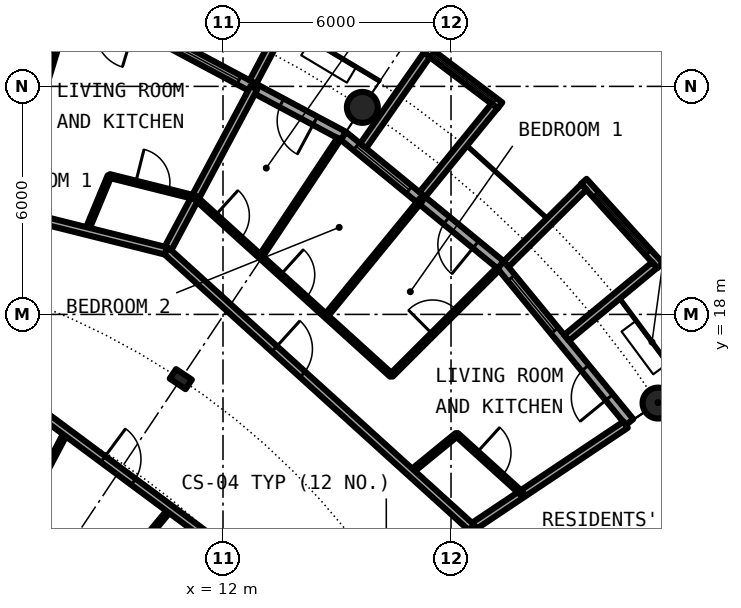
"""IFC4 building model, lengths in metres.
Left out: names, types, materials, properties, quantities, classifications, styles, units other than length and angle.
Written with IfcOpenShell. Run it as: python <this file> out.ifc"""

import sys

from ifc_helpers import new_model, si_unit, direction, frame, frame_2d, origin, origin_2d, place, context, subcontext, project, spatial, rectangle, circle, hollow_circle, i_section, extrude, element, fill, save


model = new_model("IFC4")
c1 = context("Model", 3, precision=1e-05, world=origin(), true_north=direction((0.0, 1.0)))
c2 = subcontext(c1, "Body", "Model", "MODEL_VIEW")
j1 = project(units=[si_unit("LENGTHUNIT", "METRE"), si_unit("PLANEANGLEUNIT", "RADIAN")], contexts=[c1])
p1 = place(None, origin())
s1 = spatial("IfcSite", under=j1, at=p1, CompositionType="ELEMENT")
p2 = place(p1, origin())
s2 = spatial("IfcBuilding", under=s1, at=p2, CompositionType="ELEMENT")
p3 = place(p2, frame((0.0, 0.0, 154.35)))
s3 = spatial("IfcBuildingStorey", under=s2, at=p3, CompositionType="ELEMENT", Elevation=154.35)
for number, where, z_axis, x_axis in (
    (1, (23.448, 15.667, 0.0), (0.0, 0.0, 1.0), (1.0, 0.0, 0.0)),
    (2, (15.667, 23.448, 0.0), (0.0, 0.0, 1.0), (1.0, 0.0, 0.0)),
):
    element("IfcColumn", number, at=place(p3, frame(where, z_axis=z_axis, x_axis=x_axis)), inside=s3, PredefinedType="COLUMN", context=c2, shape_type="SweptSolid", body=[
        extrude(hollow_circle(Radius=0.406, WallThickness=0.04, at=origin_2d()), origin(), (0.0, 0.0, 1.0), 3.05),
    ])
p4 = place(p3, frame((10.889, 16.297, 0.0), z_axis=(0.0, 0.0, 1.0), x_axis=(0.55557023302, 0.831469612303, 0.0)))
e3 = element("IfcColumn", 3, at=p4, inside=s3, PredefinedType="COLUMN", context=c2, shape_type="SweptSolid", body=[
    extrude(i_section(OverallWidth=0.3, OverallDepth=0.5, WebThickness=0.014, FlangeThickness=0.028, FilletRadius=0.027, at=origin_2d()), origin(), (0.0, 0.0, 1.0), 3.05),
])
p5 = place(p3, frame((22.699, 15.167, 0.0), z_axis=(0.0, 0.0, 1.0), x_axis=(-0.634382322723, 0.773019449054, 0.0)))
e4 = element("IfcWall", 4, at=p5, inside=s3, PredefinedType="SOLIDWALL", context=c2, shape_type="SweptSolid", body=[
    extrude(rectangle(XDim=5.352, YDim=0.25, at=frame_2d((2.676, 0.0))), origin(), (0.0, 0.0, 1.0), 2.7),
])
p6 = place(p5, frame((0.841, 0.0, 0.0)))
e5 = element("IfcOpeningElement", 5, at=p6, cuts=e4, PredefinedType="OPENING", context=c2, shape_type="SweptSolid", body=[
    extrude(rectangle(XDim=1.0, YDim=2.2, at=frame_2d((0.5, 1.1))), frame((0.0, 0.135, 0.0), z_axis=(0.0, -1.0, 0.0), x_axis=(1.0, 0.0, 0.0)), (0.0, 0.0, 1.0), 0.27),
])
p7 = place(p5, frame((3.111, 0.0, 0.3)))
e6 = element("IfcOpeningElement", 6, at=p7, cuts=e4, PredefinedType="OPENING", context=c2, shape_type="SweptSolid", body=[
    extrude(rectangle(XDim=1.8, YDim=2.1, at=frame_2d((0.9, 1.05))), frame((0.0, 0.135, 0.0), z_axis=(0.0, -1.0, 0.0), x_axis=(1.0, 0.0, 0.0)), (0.0, 0.0, 1.0), 0.27),
])
p8 = place(p3, frame((23.503, 19.282, -0.03), z_axis=(0.0, 0.0, 1.0), x_axis=(-0.671506829416, 0.740998365753, 0.0)))
e7 = element("IfcWall", 7, at=p8, inside=s3, PredefinedType="SOLIDWALL", context=c2, shape_type="SweptSolid", body=[
    extrude(rectangle(XDim=2.993, YDim=0.2, at=frame_2d((1.497, 0.0))), origin(), (0.0, 0.0, 1.0), 2.73),
])
p9 = place(p8, frame((0.457, 0.0, 0.33)))
e8 = element("IfcOpeningElement", 8, at=p9, cuts=e7, PredefinedType="OPENING", context=c2, shape_type="SweptSolid", body=[
    extrude(circle(Radius=1.04, at=frame_2d((1.04, 1.04))), frame((0.0, 0.11, 0.0), z_axis=(0.0, -1.0, 0.0), x_axis=(1.0, 0.0, 0.0)), (0.0, 0.0, 1.0), 0.22),
])
p10 = place(p3, frame((21.041, 17.384, -0.03), z_axis=(0.0, 0.0, 1.0), x_axis=(0.770784861449, 0.63709551667, 0.0)))
e9 = element("IfcWall", 9, at=p10, inside=s3, PredefinedType="SOLIDWALL", context=c2, shape_type="SweptSolid", body=[
    extrude(rectangle(XDim=3.006, YDim=0.2, at=frame_2d((1.503, 0.0))), origin(), (0.0, 0.0, 1.0), 2.73),
])
p11 = place(p3, frame((19.45, 19.323, -0.03), z_axis=(0.0, 0.0, 1.0), x_axis=(0.709727076896, 0.704476739375, 0.0)))
e10 = element("IfcWall", 10, at=p11, inside=s3, PredefinedType="SOLIDWALL", context=c2, shape_type="SweptSolid", body=[
    extrude(rectangle(XDim=2.883, YDim=0.2, at=frame_2d((1.441, 0.0))), origin(), (0.0, 0.0, 1.0), 2.73),
])
p12 = place(p3, frame((19.304, 19.304, 0.0), z_axis=(0.0, 0.0, 1.0), x_axis=(-0.773019449054, 0.634382322723, 0.0)))
e11 = element("IfcWall", 11, at=p12, inside=s3, PredefinedType="SOLIDWALL", context=c2, shape_type="SweptSolid", body=[
    extrude(rectangle(XDim=5.352, YDim=0.25, at=frame_2d((2.676, 0.0))), origin(), (0.0, 0.0, 1.0), 2.7),
])
p13 = place(p12, frame((0.841, 0.0, 0.0)))
e12 = element("IfcOpeningElement", 12, at=p13, cuts=e11, PredefinedType="OPENING", context=c2, shape_type="SweptSolid", body=[
    extrude(rectangle(XDim=1.0, YDim=2.2, at=frame_2d((0.5, 1.1))), frame((0.0, 0.135, 0.0), z_axis=(0.0, -1.0, 0.0), x_axis=(1.0, 0.0, 0.0)), (0.0, 0.0, 1.0), 0.27),
])
p14 = place(p12, frame((3.111, 0.0, 0.3)))
e13 = element("IfcOpeningElement", 13, at=p14, cuts=e11, PredefinedType="OPENING", context=c2, shape_type="SweptSolid", body=[
    extrude(rectangle(XDim=1.8, YDim=2.1, at=frame_2d((0.9, 1.05))), frame((0.0, 0.135, 0.0), z_axis=(0.0, -1.0, 0.0), x_axis=(1.0, 0.0, 0.0)), (0.0, 0.0, 1.0), 0.27),
])
p15 = place(p3, frame((19.289, 23.497, -0.03), z_axis=(0.0, 0.0, 1.0), x_axis=(-0.797887588059, 0.602806268067, 0.0)))
e14 = element("IfcWall", 14, at=p15, inside=s3, PredefinedType="SOLIDWALL", context=c2, shape_type="SweptSolid", body=[
    extrude(rectangle(XDim=2.447, YDim=0.2, at=frame_2d((1.223, 0.0))), origin(), (0.0, 0.0, 1.0), 2.73),
])
p16 = place(p15, frame((0.183, 0.0, 0.33)))
e15 = element("IfcOpeningElement", 15, at=p16, cuts=e14, PredefinedType="OPENING", context=c2, shape_type="SweptSolid", body=[
    extrude(circle(Radius=1.04, at=frame_2d((1.04, 1.04))), frame((0.0, 0.11, 0.0), z_axis=(0.0, -1.0, 0.0), x_axis=(1.0, 0.0, 0.0)), (0.0, 0.0, 1.0), 0.22),
])
p17 = place(p3, frame((17.246, 21.155, -0.03), z_axis=(0.0, 0.0, 1.0), x_axis=(0.631741648902, 0.775179004516, 0.0)))
e16 = element("IfcWall", 16, at=p17, inside=s3, PredefinedType="SOLIDWALL", context=c2, shape_type="SweptSolid", body=[
    extrude(rectangle(XDim=3.006, YDim=0.2, at=frame_2d((1.503, 0.0))), origin(), (0.0, 0.0, 1.0), 2.73),
])
p18 = place(p3, frame((15.688, 22.433, -0.03), z_axis=(0.0, 0.0, 1.0), x_axis=(0.573260687834, 0.819373043115, 0.0)))
e17 = element("IfcWall", 17, at=p18, inside=s3, PredefinedType="SOLIDWALL", context=c2, shape_type="SweptSolid", body=[
    extrude(rectangle(XDim=2.925, YDim=0.2, at=frame_2d((1.463, 0.0))), origin(), (0.0, 0.0, 1.0), 2.73),
])
p19 = place(p3, frame((15.167, 22.699, 0.0), z_axis=(0.0, 0.0, 1.0), x_axis=(-0.881915646801, 0.471407246368, 0.0)))
e18 = element("IfcWall", 18, at=p19, inside=s3, PredefinedType="SOLIDWALL", context=c2, shape_type="SweptSolid", body=[
    extrude(rectangle(XDim=5.352, YDim=0.25, at=frame_2d((2.676, 0.0))), origin(), (0.0, 0.0, 1.0), 2.7),
])
p20 = place(p19, frame((0.841, 0.0, 0.0)))
e19 = element("IfcOpeningElement", 19, at=p20, cuts=e18, PredefinedType="OPENING", context=c2, shape_type="SweptSolid", body=[
    extrude(rectangle(XDim=1.0, YDim=2.2, at=frame_2d((0.5, 1.1))), frame((0.0, 0.135, 0.0), z_axis=(0.0, -1.0, 0.0), x_axis=(1.0, 0.0, 0.0)), (0.0, 0.0, 1.0), 0.27),
])
p21 = place(p19, frame((3.111, 0.0, 0.3)))
e20 = element("IfcOpeningElement", 20, at=p21, cuts=e18, PredefinedType="OPENING", context=c2, shape_type="SweptSolid", body=[
    extrude(rectangle(XDim=1.8, YDim=2.1, at=frame_2d((0.9, 1.05))), frame((0.0, 0.135, 0.0), z_axis=(0.0, -1.0, 0.0), x_axis=(1.0, 0.0, 0.0)), (0.0, 0.0, 1.0), 0.27),
])
p22 = place(p3, frame((12.787, 24.113, -0.03), z_axis=(0.0, 0.0, 1.0), x_axis=(0.468365282436, 0.883534924159, 0.0)))
e21 = element("IfcWall", 21, at=p22, inside=s3, PredefinedType="SOLIDWALL", context=c2, shape_type="SweptSolid", body=[
    extrude(rectangle(XDim=3.006, YDim=0.2, at=frame_2d((1.503, 0.0))), origin(), (0.0, 0.0, 1.0), 2.73),
])
p23 = place(p3, frame((8.41, 20.193, 0.0), z_axis=(0.0, 0.0, 1.0), x_axis=(0.384228756538, 0.923237923099, 0.0)))
e22 = element("IfcWall", 22, at=p23, inside=s3, PredefinedType="PARTITIONING", context=c2, shape_type="SweptSolid", body=[
    extrude(rectangle(XDim=1.569, YDim=0.1, at=frame_2d((0.785, 0.0))), origin(), (0.0, 0.0, 1.0), 2.7),
])
p24 = place(p3, frame((4.909, 5.958, 0.0), z_axis=(0.0, 0.0, 1.0), x_axis=(0.635879010442, 0.771788756124, 0.0)))
e23 = element("IfcWall", 23, at=p24, inside=s3, PredefinedType="PARTITIONING", context=c2, shape_type="SweptSolid", body=[
    extrude(rectangle(XDim=8.967, YDim=0.1, at=frame_2d((4.484, 0.0))), origin(), (0.0, 0.0, 1.0), 2.7),
])
p25 = place(p24, frame((6.4, 0.0, 0.0)))
e24 = element("IfcOpeningElement", 24, at=p25, cuts=e23, PredefinedType="OPENING", context=c2, shape_type="SweptSolid", body=[
    extrude(rectangle(XDim=0.9, YDim=2.3, at=frame_2d((0.45, 1.15))), frame((0.0, 0.06, 0.0), z_axis=(0.0, -1.0, 0.0), x_axis=(1.0, 0.0, 0.0)), (0.0, 0.0, 1.0), 0.12),
])
p26 = place(p24, frame((1.917, 0.0, 0.0)))
e25 = element("IfcOpeningElement", 25, at=p26, cuts=e23, PredefinedType="OPENING", context=c2, shape_type="SweptSolid", body=[
    extrude(rectangle(XDim=0.9, YDim=2.3, at=frame_2d((0.45, 1.15))), frame((0.0, 0.06, 0.0), z_axis=(0.0, -1.0, 0.0), x_axis=(1.0, 0.0, 0.0)), (0.0, 0.0, 1.0), 0.12),
])
p27 = place(p3, frame((5.877, 11.125, 0.0), z_axis=(0.0, 0.0, 1.0), x_axis=(0.467030118529, 0.884241408432, 0.0)))
e26 = element("IfcWall", 26, at=p27, inside=s3, PredefinedType="PARTITIONING", context=c2, shape_type="SweptSolid", body=[
    extrude(rectangle(XDim=4.278, YDim=0.1, at=frame_2d((2.139, 0.0))), origin(), (0.0, 0.0, 1.0), 2.7),
])
p28 = place(p27, frame((1.689, 0.0, 0.0)))
e27 = element("IfcOpeningElement", 27, at=p28, cuts=e26, PredefinedType="OPENING", context=c2, shape_type="SweptSolid", body=[
    extrude(rectangle(XDim=0.9, YDim=2.3, at=frame_2d((0.45, 1.15))), frame((0.0, 0.06, 0.0), z_axis=(0.0, -1.0, 0.0), x_axis=(1.0, 0.0, 0.0)), (0.0, 0.0, 1.0), 0.12),
])
p29 = place(p3, frame((6.76, 22.207, 0.0), z_axis=(0.0, 0.0, 1.0), x_axis=(0.291291575636, 0.956634317785, 0.0)))
e28 = element("IfcWall", 28, at=p29, inside=s3, PredefinedType="PARTITIONING", context=c2, shape_type="SweptSolid", body=[
    extrude(rectangle(XDim=3.962, YDim=0.1, at=frame_2d((1.981, 0.0))), origin(), (0.0, 0.0, 1.0), 2.7),
])
p30 = place(p29, frame((1.531, 0.0, 0.0)))
e29 = element("IfcOpeningElement", 29, at=p30, cuts=e28, PredefinedType="OPENING", context=c2, shape_type="SweptSolid", body=[
    extrude(rectangle(XDim=0.9, YDim=2.3, at=frame_2d((0.45, 1.15))), frame((0.0, 0.06, 0.0), z_axis=(0.0, -1.0, 0.0), x_axis=(1.0, 0.0, 0.0)), (0.0, 0.0, 1.0), 0.12),
])
p31 = place(p3, frame((10.516, 19.665, 0.0), z_axis=(0.0, 0.0, 1.0), x_axis=(0.471388689095, 0.881925565903, 0.0)))
e30 = element("IfcWall", 30, at=p31, inside=s3, PredefinedType="PARTITIONING", context=c2, shape_type="SweptSolid", body=[
    extrude(rectangle(XDim=4.875, YDim=0.2, at=frame_2d((2.438, 0.0))), origin(), (0.0, 0.0, 1.0), 2.7),
])
p32 = place(p3, frame((12.988, 19.518, 0.0), z_axis=(0.0, 0.0, 1.0), x_axis=(0.553823887887, 0.83263383381, 0.0)))
e31 = element("IfcWall", 31, at=p32, inside=s3, PredefinedType="PARTITIONING", context=c2, shape_type="SweptSolid", body=[
    extrude(rectangle(XDim=3.73, YDim=0.1, at=frame_2d((1.865, 0.0))), origin(), (0.0, 0.0, 1.0), 2.7),
])
p33 = place(p3, frame((14.709, 17.958, 0.0), z_axis=(0.0, 0.0, 1.0), x_axis=(0.633590098448, 0.773668913133, 0.0)))
e32 = element("IfcWall", 32, at=p33, inside=s3, PredefinedType="PARTITIONING", context=c2, shape_type="SweptSolid", body=[
    extrude(rectangle(XDim=3.962, YDim=0.1, at=frame_2d((1.981, 0.0))), origin(), (0.0, 0.0, 1.0), 2.7),
])
p34 = place(p3, frame((16.43, 16.398, 0.0), z_axis=(0.0, 0.0, 1.0), x_axis=(0.707722727509, 0.706490297858, 0.0)))
e33 = element("IfcWall", 33, at=p34, inside=s3, PredefinedType="PARTITIONING", context=c2, shape_type="SweptSolid", body=[
    extrude(rectangle(XDim=3.962, YDim=0.1, at=frame_2d((1.981, 0.0))), origin(), (0.0, 0.0, 1.0), 2.7),
])
p35 = place(p34, frame((1.531, 0.0, 0.0)))
e34 = element("IfcOpeningElement", 34, at=p35, cuts=e33, PredefinedType="OPENING", context=c2, shape_type="SweptSolid", body=[
    extrude(rectangle(XDim=0.9, YDim=2.3, at=frame_2d((0.45, 1.15))), frame((0.0, 0.06, 0.0), z_axis=(0.0, -1.0, 0.0), x_axis=(1.0, 0.0, 0.0)), (0.0, 0.0, 1.0), 0.12),
])
p36 = place(p3, frame((16.936, 13.845, 0.0), z_axis=(0.0, 0.0, 1.0), x_axis=(0.774283039722, 0.632839453889, 0.0)))
e35 = element("IfcWall", 35, at=p36, inside=s3, PredefinedType="PARTITIONING", context=c2, shape_type="SweptSolid", body=[
    extrude(rectangle(XDim=1.569, YDim=0.1, at=frame_2d((0.785, 0.0))), origin(), (0.0, 0.0, 1.0), 2.7),
])
p37 = place(p3, frame((18.542, 12.389, 0.0), z_axis=(0.0, 0.0, 1.0), x_axis=(0.831387096605, 0.55569370664, 0.0)))
e36 = element("IfcWall", 36, at=p37, inside=s3, PredefinedType="PARTITIONING", context=c2, shape_type="SweptSolid", body=[
    extrude(rectangle(XDim=4.875, YDim=0.2, at=frame_2d((2.438, 0.0))), origin(), (0.0, 0.0, 1.0), 2.7),
])
p38 = place(p3, frame((5.137, 16.938, 0.0), z_axis=(0.0, 0.0, 1.0), x_axis=(0.803229232922, -0.595670042371, 0.0)))
e37 = element("IfcWall", 37, at=p38, inside=s3, PredefinedType="PARTITIONING", context=c2, shape_type="SweptSolid", body=[
    extrude(rectangle(XDim=10.224, YDim=0.2, at=frame_2d((5.112, 0.0))), origin(), (0.0, 0.0, 1.0), 2.7),
])
p39 = place(p38, frame((4.612, 0.0, 0.0)))
e38 = element("IfcOpeningElement", 38, at=p39, cuts=e37, PredefinedType="OPENING", context=c2, shape_type="SweptSolid", body=[
    extrude(rectangle(XDim=1.0, YDim=2.3, at=frame_2d((0.5, 1.15))), frame((0.0, 0.11, 0.0), z_axis=(0.0, -1.0, 0.0), x_axis=(1.0, 0.0, 0.0)), (0.0, 0.0, 1.0), 0.22),
])
p40 = place(p3, frame((-0.006, 22.299, 0.0), z_axis=(0.0, 0.0, 1.0), x_axis=(0.970086843848, -0.242758141765, 0.0)))
e39 = element("IfcWall", 39, at=p40, inside=s3, PredefinedType="PARTITIONING", context=c2, shape_type="SweptSolid", body=[
    extrude(rectangle(XDim=10.842, YDim=0.2, at=frame_2d((5.421, 0.0))), origin(), (0.0, 0.0, 1.0), 2.7),
])
p41 = place(p40, frame((3.841, 0.0, 0.0)))
e40 = element("IfcOpeningElement", 40, at=p41, cuts=e39, PredefinedType="OPENING", context=c2, shape_type="SweptSolid", body=[
    extrude(rectangle(XDim=1.0, YDim=2.3, at=frame_2d((0.5, 1.15))), frame((0.0, 0.11, 0.0), z_axis=(0.0, -1.0, 0.0), x_axis=(1.0, 0.0, 0.0)), (0.0, 0.0, 1.0), 0.22),
])
p42 = place(p3, frame((10.512, 19.667, 0.0), z_axis=(0.0, 0.0, 1.0), x_axis=(0.740947367223, -0.671563101283, 0.0)))
e41 = element("IfcWall", 41, at=p42, inside=s3, PredefinedType="PARTITIONING", context=c2, shape_type="SweptSolid", body=[
    extrude(rectangle(XDim=10.837, YDim=0.2, at=frame_2d((5.419, 0.0))), origin(), (0.0, 0.0, 1.0), 2.7),
])
p43 = place(p42, frame((3.835, 0.0, 0.0)))
e42 = element("IfcOpeningElement", 42, at=p43, cuts=e41, PredefinedType="OPENING", context=c2, shape_type="SweptSolid", body=[
    extrude(rectangle(XDim=1.0, YDim=2.3, at=frame_2d((0.5, 1.15))), frame((0.0, 0.11, 0.0), z_axis=(0.0, -1.0, 0.0), x_axis=(1.0, 0.0, 0.0)), (0.0, 0.0, 1.0), 0.22),
])
p44 = place(p3, frame((18.542, 12.389, 0.0), z_axis=(0.0, 0.0, 1.0), x_axis=(0.465605550524, -0.884992356646, 0.0)))
e43 = element("IfcWall", 43, at=p44, inside=s3, PredefinedType="PARTITIONING", context=c2, shape_type="SweptSolid", body=[
    extrude(rectangle(XDim=1.643, YDim=0.2, at=frame_2d((0.821, 0.0))), origin(), (0.0, 0.0, 1.0), 2.7),
])
p45 = place(p3, frame((9.013, 21.642, 0.0), z_axis=(0.0, 0.0, 1.0), x_axis=(0.970049686104, -0.242906579758, 0.0)))
e44 = element("IfcWall", 44, at=p45, inside=s3, PredefinedType="PARTITIONING", context=c2, shape_type="SweptSolid", body=[
    extrude(rectangle(XDim=2.323, YDim=0.1, at=frame_2d((1.161, 0.0))), origin(), (0.0, 0.0, 1.0), 2.7),
])
p46 = place(p45, frame((0.711, 0.0, 0.0)))
e45 = element("IfcOpeningElement", 45, at=p46, cuts=e44, PredefinedType="OPENING", context=c2, shape_type="SweptSolid", body=[
    extrude(rectangle(XDim=0.9, YDim=2.3, at=frame_2d((0.45, 1.15))), frame((0.0, 0.06, 0.0), z_axis=(0.0, -1.0, 0.0), x_axis=(1.0, 0.0, 0.0)), (0.0, 0.0, 1.0), 0.12),
])
p47 = place(p3, frame((11.266, 21.078, 0.0), z_axis=(0.0, 0.0, 1.0), x_axis=(0.74097115376, -0.671536856245, 0.0)))
e46 = element("IfcWall", 46, at=p47, inside=s3, PredefinedType="PARTITIONING", context=c2, shape_type="SweptSolid", body=[
    extrude(rectangle(XDim=6.969, YDim=0.1, at=frame_2d((3.484, 0.0))), origin(), (0.0, 0.0, 1.0), 2.7),
])
p48 = place(p47, frame((3.034, 0.0, 0.0)))
e47 = element("IfcOpeningElement", 47, at=p48, cuts=e46, PredefinedType="OPENING", context=c2, shape_type="SweptSolid", body=[
    extrude(rectangle(XDim=0.9, YDim=2.3, at=frame_2d((0.45, 1.15))), frame((0.0, 0.06, 0.0), z_axis=(0.0, -1.0, 0.0), x_axis=(1.0, 0.0, 0.0)), (0.0, 0.0, 1.0), 0.12),
])
p49 = place(p47, frame((0.712, 0.0, 0.0)))
e48 = element("IfcOpeningElement", 48, at=p49, cuts=e46, PredefinedType="OPENING", context=c2, shape_type="SweptSolid", body=[
    extrude(rectangle(XDim=0.9, YDim=2.3, at=frame_2d((0.45, 1.15))), frame((0.0, 0.06, 0.0), z_axis=(0.0, -1.0, 0.0), x_axis=(1.0, 0.0, 0.0)), (0.0, 0.0, 1.0), 0.12),
])
p50 = place(p3, frame((18.149, 14.84, 0.0), z_axis=(0.0, 0.0, 1.0), x_axis=(0.741127434804, -0.671364376014, 0.0)))
e49 = element("IfcWall", 49, at=p50, inside=s3, PredefinedType="PARTITIONING", context=c2, shape_type="SweptSolid", body=[
    extrude(rectangle(XDim=2.324, YDim=0.1, at=frame_2d((1.162, 0.0))), origin(), (0.0, 0.0, 1.0), 2.7),
])
p51 = place(p50, frame((0.714, 0.0, 0.0)))
e50 = element("IfcOpeningElement", 50, at=p51, cuts=e49, PredefinedType="OPENING", context=c2, shape_type="SweptSolid", body=[
    extrude(rectangle(XDim=0.9, YDim=2.3, at=frame_2d((0.45, 1.15))), frame((0.0, 0.06, 0.0), z_axis=(0.0, -1.0, 0.0), x_axis=(1.0, 0.0, 0.0)), (0.0, 0.0, 1.0), 0.12),
])
p52 = place(p6, origin())
e51 = element("IfcDoor", 51, at=p52, inside=s3, OperationType="SINGLE_SWING_LEFT", PredefinedType="DOOR", context=c2, shape_type="SweptSolid", body=[
    extrude(rectangle(XDim=1.0, YDim=2.2, at=frame_2d((0.5, 1.1))), frame((0.0, 0.025, 0.0), z_axis=(0.0, -1.0, 0.0), x_axis=(1.0, 0.0, 0.0)), (0.0, 0.0, 1.0), 0.05),
])
fill(e5, e51)
p53 = place(p7, origin())
e52 = element("IfcWindow", 52, at=p53, inside=s3, PartitioningType="SINGLE_PANEL", PredefinedType="WINDOW", context=c2, shape_type="SweptSolid", body=[
    extrude(rectangle(XDim=1.8, YDim=2.1, at=frame_2d((0.9, 1.05))), frame((0.0, 0.03, 0.0), z_axis=(0.0, -1.0, 0.0), x_axis=(1.0, 0.0, 0.0)), (0.0, 0.0, 1.0), 0.06),
])
fill(e6, e52)
p54 = place(p9, origin())
e53 = element("IfcWindow", 53, at=p54, inside=s3, PartitioningType="SINGLE_PANEL", PredefinedType="WINDOW", context=c2, shape_type="SweptSolid", body=[
    extrude(circle(Radius=1.04, at=frame_2d((1.04, 1.04))), frame((0.0, 0.03, 0.0), z_axis=(0.0, -1.0, 0.0), x_axis=(1.0, 0.0, 0.0)), (0.0, 0.0, 1.0), 0.06),
])
fill(e8, e53)
p55 = place(p13, origin())
e54 = element("IfcDoor", 54, at=p55, inside=s3, OperationType="SINGLE_SWING_LEFT", PredefinedType="DOOR", context=c2, shape_type="SweptSolid", body=[
    extrude(rectangle(XDim=1.0, YDim=2.2, at=frame_2d((0.5, 1.1))), frame((0.0, 0.025, 0.0), z_axis=(0.0, -1.0, 0.0), x_axis=(1.0, 0.0, 0.0)), (0.0, 0.0, 1.0), 0.05),
])
fill(e12, e54)
p56 = place(p14, origin())
e55 = element("IfcWindow", 55, at=p56, inside=s3, PartitioningType="SINGLE_PANEL", PredefinedType="WINDOW", context=c2, shape_type="SweptSolid", body=[
    extrude(rectangle(XDim=1.8, YDim=2.1, at=frame_2d((0.9, 1.05))), frame((0.0, 0.03, 0.0), z_axis=(0.0, -1.0, 0.0), x_axis=(1.0, 0.0, 0.0)), (0.0, 0.0, 1.0), 0.06),
])
fill(e13, e55)
p57 = place(p16, origin())
e56 = element("IfcWindow", 56, at=p57, inside=s3, PartitioningType="SINGLE_PANEL", PredefinedType="WINDOW", context=c2, shape_type="SweptSolid", body=[
    extrude(circle(Radius=1.04, at=frame_2d((1.04, 1.04))), frame((0.0, 0.03, 0.0), z_axis=(0.0, -1.0, 0.0), x_axis=(1.0, 0.0, 0.0)), (0.0, 0.0, 1.0), 0.06),
])
fill(e15, e56)
p58 = place(p20, origin())
e57 = element("IfcDoor", 57, at=p58, inside=s3, OperationType="SINGLE_SWING_LEFT", PredefinedType="DOOR", context=c2, shape_type="SweptSolid", body=[
    extrude(rectangle(XDim=1.0, YDim=2.2, at=frame_2d((0.5, 1.1))), frame((0.0, 0.025, 0.0), z_axis=(0.0, -1.0, 0.0), x_axis=(1.0, 0.0, 0.0)), (0.0, 0.0, 1.0), 0.05),
])
fill(e19, e57)
p59 = place(p21, origin())
e58 = element("IfcWindow", 58, at=p59, inside=s3, PartitioningType="SINGLE_PANEL", PredefinedType="WINDOW", context=c2, shape_type="SweptSolid", body=[
    extrude(rectangle(XDim=1.8, YDim=2.1, at=frame_2d((0.9, 1.05))), frame((0.0, 0.03, 0.0), z_axis=(0.0, -1.0, 0.0), x_axis=(1.0, 0.0, 0.0)), (0.0, 0.0, 1.0), 0.06),
])
fill(e20, e58)
p60 = place(p43, origin())
e59 = element("IfcDoor", 59, at=p60, inside=s3, OperationType="SINGLE_SWING_LEFT", PredefinedType="DOOR", context=c2, shape_type="SweptSolid", body=[
    extrude(rectangle(XDim=1.0, YDim=2.3, at=frame_2d((0.5, 1.15))), frame((0.0, 0.025, 0.0), z_axis=(0.0, -1.0, 0.0), x_axis=(1.0, 0.0, 0.0)), (0.0, 0.0, 1.0), 0.05),
])
fill(e42, e59)
p61 = place(p51, origin())
e60 = element("IfcDoor", 60, at=p61, inside=s3, OperationType="SINGLE_SWING_RIGHT", PredefinedType="DOOR", context=c2, shape_type="SweptSolid", body=[
    extrude(rectangle(XDim=0.9, YDim=2.3, at=frame_2d((0.45, 1.15))), frame((0.0, 0.025, 0.0), z_axis=(0.0, -1.0, 0.0), x_axis=(1.0, 0.0, 0.0)), (0.0, 0.0, 1.0), 0.05),
])
fill(e50, e60)
p62 = place(p35, origin())
e61 = element("IfcDoor", 61, at=p62, inside=s3, OperationType="SINGLE_SWING_RIGHT", PredefinedType="DOOR", context=c2, shape_type="SweptSolid", body=[
    extrude(rectangle(XDim=0.9, YDim=2.3, at=frame_2d((0.45, 1.15))), frame((0.0, 0.025, 0.0), z_axis=(0.0, -1.0, 0.0), x_axis=(1.0, 0.0, 0.0)), (0.0, 0.0, 1.0), 0.05),
])
fill(e34, e61)
p63 = place(p48, origin())
e62 = element("IfcDoor", 62, at=p63, inside=s3, OperationType="SINGLE_SWING_LEFT", PredefinedType="DOOR", context=c2, shape_type="SweptSolid", body=[
    extrude(rectangle(XDim=0.9, YDim=2.3, at=frame_2d((0.45, 1.15))), frame((0.0, 0.025, 0.0), z_axis=(0.0, -1.0, 0.0), x_axis=(1.0, 0.0, 0.0)), (0.0, 0.0, 1.0), 0.05),
])
fill(e47, e62)
p64 = place(p49, origin())
e63 = element("IfcDoor", 63, at=p64, inside=s3, OperationType="SINGLE_SWING_LEFT", PredefinedType="DOOR", context=c2, shape_type="SweptSolid", body=[
    extrude(rectangle(XDim=0.9, YDim=2.3, at=frame_2d((0.45, 1.15))), frame((0.0, 0.025, 0.0), z_axis=(0.0, -1.0, 0.0), x_axis=(1.0, 0.0, 0.0)), (0.0, 0.0, 1.0), 0.05),
])
fill(e48, e63)
p65 = place(p46, origin())
e64 = element("IfcDoor", 64, at=p65, inside=s3, OperationType="SINGLE_SWING_RIGHT", PredefinedType="DOOR", context=c2, shape_type="SweptSolid", body=[
    extrude(rectangle(XDim=0.9, YDim=2.3, at=frame_2d((0.45, 1.15))), frame((0.0, 0.025, 0.0), z_axis=(0.0, -1.0, 0.0), x_axis=(1.0, 0.0, 0.0)), (0.0, 0.0, 1.0), 0.05),
])
fill(e45, e64)
p66 = place(p39, origin())
e65 = element("IfcDoor", 65, at=p66, inside=s3, OperationType="SINGLE_SWING_RIGHT", PredefinedType="DOOR", context=c2, shape_type="SweptSolid", body=[
    extrude(rectangle(XDim=1.0, YDim=2.3, at=frame_2d((0.5, 1.15))), frame((0.0, 0.025, 0.0), z_axis=(0.0, -1.0, 0.0), x_axis=(1.0, 0.0, 0.0)), (0.0, 0.0, 1.0), 0.05),
])
fill(e38, e65)
save(model, sys.argv[1])
